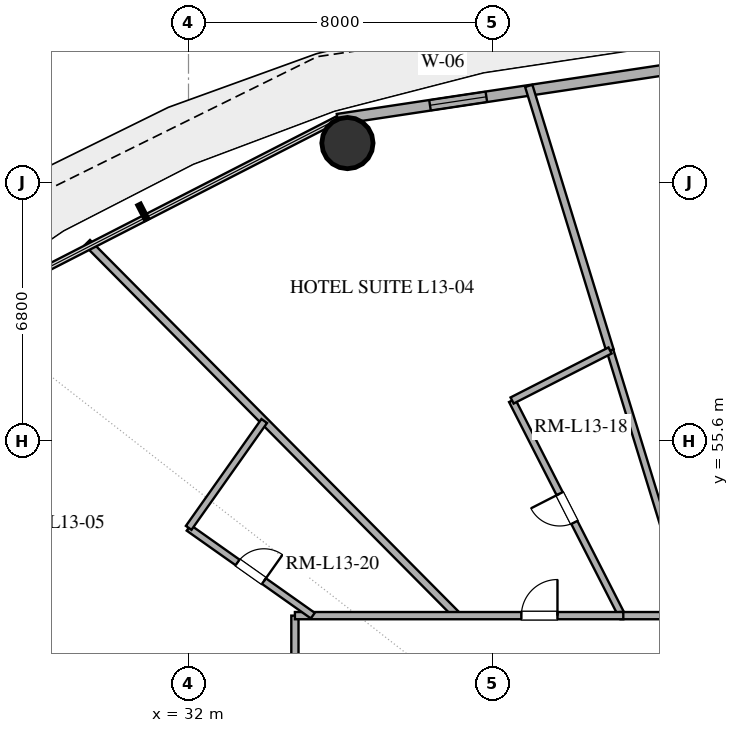
"""IFC4 building model, lengths in metres.
Left out: names, types, materials, properties, quantities, classifications, styles, units other than length and angle.
Written with IfcOpenShell. Run it as: python <this file> out.ifc"""

import sys

from ifc_helpers import new_model, si_unit, direction, frame, frame_2d, origin, origin_2d, place, context, subcontext, project, spatial, rectangle, hollow_circle, extrude, element, fill, save


model = new_model("IFC4")
c1 = context("Model", 3, precision=1e-05, world=origin(), true_north=direction((0.0, 1.0)))
c2 = subcontext(c1, "Body", "Model", "MODEL_VIEW")
j1 = project(units=[si_unit("LENGTHUNIT", "METRE"), si_unit("PLANEANGLEUNIT", "RADIAN")], contexts=[c1])
p1 = place(None, origin())
s1 = spatial("IfcSite", under=j1, at=p1, CompositionType="ELEMENT")
p2 = place(p1, origin())
s2 = spatial("IfcBuilding", under=s1, at=p2, CompositionType="ELEMENT")
p3 = place(p2, frame((0.0, 0.0, 57.0)))
s3 = spatial("IfcBuildingStorey", under=s2, at=p3, CompositionType="ELEMENT", Elevation=57.0)
p4 = place(p3, frame((36.182, 63.434, 0.0), z_axis=(0.0, 0.0, 1.0), x_axis=(1.0, 0.0, 0.0)))
e1 = element("IfcColumn", 1, at=p4, inside=s3, PredefinedType="COLUMN", context=c2, shape_type="SweptSolid", body=[
    extrude(hollow_circle(Radius=0.675, WallThickness=0.036, at=origin_2d()), origin(), (0.0, 0.0, 1.0), 3.38),
])
p5 = place(p3, frame((48.0, 65.88, 0.0), z_axis=(0.0, 0.0, 1.0), x_axis=(-0.988864835849, -0.148816452121, 0.0)))
e2 = element("IfcWall", 2, at=p5, inside=s3, PredefinedType="SOLIDWALL", context=c2, shape_type="SweptSolid", body=[
    extrude(rectangle(XDim=12.214, YDim=0.28, at=frame_2d((6.107, 0.0))), origin(), (0.0, 0.0, 1.0), 3.38),
])
p6 = place(p5, frame((1.531, 0.0, 0.0)))
e3 = element("IfcOpeningElement", 3, at=p6, cuts=e2, PredefinedType="OPENING", context=c2, shape_type="SweptSolid", body=[
    extrude(rectangle(XDim=1.1, YDim=2.25, at=frame_2d((0.55, 1.125))), frame((0.0, 0.15, 0.0), z_axis=(0.0, -1.0, 0.0), x_axis=(1.0, 0.0, 0.0)), (0.0, 0.0, 1.0), 0.3),
])
p7 = place(p5, frame((8.254, 0.0, 0.85)))
e4 = element("IfcOpeningElement", 4, at=p7, cuts=e2, PredefinedType="OPENING", context=c2, shape_type="SweptSolid", body=[
    extrude(rectangle(XDim=1.5, YDim=2.0, at=frame_2d((0.75, 1.0))), frame((0.0, 0.15, 0.0), z_axis=(0.0, -1.0, 0.0), x_axis=(1.0, 0.0, 0.0)), (0.0, 0.0, 1.0), 0.3),
])
p8 = place(p3, frame((34.8, 46.172, 0.0), z_axis=(0.0, 0.0, 1.0), x_axis=(-0.953511676516, 0.301356073023, 0.0)))
e5 = element("IfcWall", 5, at=p8, inside=s3, PredefinedType="PARTITIONING", context=c2, shape_type="SweptSolid", body=[
    extrude(rectangle(XDim=16.275, YDim=0.2, at=frame_2d((8.137, 0.0))), origin(), (0.0, 0.0, 1.0), 2.74),
])
p9 = place(p3, frame((43.092, 57.976, 0.0), z_axis=(0.0, 0.0, 1.0), x_axis=(0.293648581073, -0.95591344317, 0.0)))
e6 = element("IfcWall", 6, at=p9, inside=s3, PredefinedType="PLUMBINGWALL", context=c2, shape_type="SweptSolid", body=[
    extrude(rectangle(XDim=7.298, YDim=0.18, at=frame_2d((3.649, 0.0))), origin(), (0.0, 0.0, 1.0), 2.74),
])
p10 = place(p3, frame((40.953, 64.939, 0.0), z_axis=(0.0, 0.0, 1.0), x_axis=(0.293635973675, -0.955917315966, 0.0)))
e7 = element("IfcWall", 7, at=p10, inside=s3, PredefinedType="PARTITIONING", context=c2, shape_type="SweptSolid", body=[
    extrude(rectangle(XDim=7.284, YDim=0.2, at=frame_2d((3.642, 0.0))), origin(), (0.0, 0.0, 1.0), 2.74),
])
p11 = place(p3, frame((39.072, 51.0, 0.0), z_axis=(0.0, 0.0, 1.0), x_axis=(-0.704257683765, 0.70994444491, 0.0)))
e8 = element("IfcWall", 8, at=p11, inside=s3, PredefinedType="PARTITIONING", context=c2, shape_type="SweptSolid", body=[
    extrude(rectangle(XDim=13.824, YDim=0.2, at=frame_2d((6.912, 0.0))), origin(), (0.0, 0.0, 1.0), 2.74),
])
p12 = place(p3, frame((43.405, 51.0, 0.0), z_axis=(0.0, 0.0, 1.0), x_axis=(-0.454680565764, 0.890654581259, 0.0)))
e9 = element("IfcWall", 9, at=p12, inside=s3, PredefinedType="PLUMBINGWALL", context=c2, shape_type="SweptSolid", body=[
    extrude(rectangle(XDim=6.356, YDim=0.18, at=frame_2d((3.178, 0.0))), origin(), (0.0, 0.0, 1.0), 2.74),
])
p13 = place(p12, frame((2.753, 0.0, 0.0)))
e10 = element("IfcOpeningElement", 10, at=p13, cuts=e9, PredefinedType="OPENING", context=c2, shape_type="SweptSolid", body=[
    extrude(rectangle(XDim=0.85, YDim=2.1, at=frame_2d((0.425, 1.05))), frame((0.0, 0.1, 0.0), z_axis=(0.0, -1.0, 0.0), x_axis=(1.0, 0.0, 0.0)), (0.0, 0.0, 1.0), 0.2),
])
p14 = place(p3, frame((43.369, 51.0, 0.0), z_axis=(0.0, 0.0, 1.0), x_axis=(1.0, 0.0, 0.0)))
e11 = element("IfcWall", 11, at=p14, inside=s3, PredefinedType="PARTITIONING", context=c2, shape_type="SweptSolid", body=[
    extrude(rectangle(XDim=17.831, YDim=0.19, at=frame_2d((8.916, 0.0))), origin(), (0.0, 0.0, 1.0), 2.74),
])
p15 = place(p14, frame((14.29, 0.0, 0.0)))
e12 = element("IfcOpeningElement", 12, at=p15, cuts=e11, PredefinedType="OPENING", context=c2, shape_type="SweptSolid", body=[
    extrude(rectangle(XDim=0.95, YDim=2.15, at=frame_2d((0.475, 1.075))), frame((0.0, 0.105, 0.0), z_axis=(0.0, -1.0, 0.0), x_axis=(1.0, 0.0, 0.0)), (0.0, 0.0, 1.0), 0.21),
])
p16 = place(p14, frame((8.533, 0.0, 0.0)))
e13 = element("IfcOpeningElement", 13, at=p16, cuts=e11, PredefinedType="OPENING", context=c2, shape_type="SweptSolid", body=[
    extrude(rectangle(XDim=1.0, YDim=2.2, at=frame_2d((0.5, 1.1))), frame((0.0, 0.105, 0.0), z_axis=(0.0, -1.0, 0.0), x_axis=(1.0, 0.0, 0.0)), (0.0, 0.0, 1.0), 0.21),
])
p17 = place(p14, frame((3.591, 0.0, 0.0)))
e14 = element("IfcOpeningElement", 14, at=p17, cuts=e11, PredefinedType="OPENING", context=c2, shape_type="SweptSolid", body=[
    extrude(rectangle(XDim=1.0, YDim=2.2, at=frame_2d((0.5, 1.1))), frame((0.0, 0.105, 0.0), z_axis=(0.0, -1.0, 0.0), x_axis=(1.0, 0.0, 0.0)), (0.0, 0.0, 1.0), 0.21),
])
p18 = place(p3, frame((34.8, 43.722, 0.0), z_axis=(0.0, 0.0, 1.0), x_axis=(0.0, 1.0, 0.0)))
e15 = element("IfcWall", 15, at=p18, inside=s3, PredefinedType="PARTITIONING", context=c2, shape_type="SweptSolid", body=[
    extrude(rectangle(XDim=7.278, YDim=0.19, at=frame_2d((3.639, 0.0))), origin(), (0.0, 0.0, 1.0), 2.74),
])
p19 = place(p18, frame((4.372, 0.0, 0.0)))
e16 = element("IfcOpeningElement", 16, at=p19, cuts=e15, PredefinedType="OPENING", context=c2, shape_type="SweptSolid", body=[
    extrude(rectangle(XDim=0.95, YDim=2.15, at=frame_2d((0.475, 1.075))), frame((0.0, 0.105, 0.0), z_axis=(0.0, -1.0, 0.0), x_axis=(1.0, 0.0, 0.0)), (0.0, 0.0, 1.0), 0.21),
])
p20 = place(p3, frame((34.8, 51.0, 0.0), z_axis=(0.0, 0.0, 1.0), x_axis=(1.0, 0.0, 0.0)))
e17 = element("IfcWall", 17, at=p20, inside=s3, PredefinedType="PARTITIONING", context=c2, shape_type="SweptSolid", body=[
    extrude(rectangle(XDim=8.641, YDim=0.19, at=frame_2d((4.32, 0.0))), origin(), (0.0, 0.0, 1.0), 2.74),
])
p21 = place(p20, frame((5.959, 0.0, 0.0)))
e18 = element("IfcOpeningElement", 18, at=p21, cuts=e17, PredefinedType="OPENING", context=c2, shape_type="SweptSolid", body=[
    extrude(rectangle(XDim=0.95, YDim=2.15, at=frame_2d((0.475, 1.075))), frame((0.0, 0.105, 0.0), z_axis=(0.0, -1.0, 0.0), x_axis=(1.0, 0.0, 0.0)), (0.0, 0.0, 1.0), 0.21),
])
p22 = place(p3, frame((32.005, 53.309, 0.0), z_axis=(0.0, 0.0, 1.0), x_axis=(0.816524416543, -0.577310901672, 0.0)))
e19 = element("IfcWall", 19, at=p22, inside=s3, PredefinedType="PLUMBINGWALL", context=c2, shape_type="SweptSolid", body=[
    extrude(rectangle(XDim=4.0, YDim=0.18, at=frame_2d((2.0, 0.0))), origin(), (0.0, 0.0, 1.0), 2.74),
])
p23 = place(p22, frame((1.575, 0.0, 0.0)))
e20 = element("IfcOpeningElement", 20, at=p23, cuts=e19, PredefinedType="OPENING", context=c2, shape_type="SweptSolid", body=[
    extrude(rectangle(XDim=0.85, YDim=2.1, at=frame_2d((0.425, 1.05))), frame((0.0, 0.1, 0.0), z_axis=(0.0, -1.0, 0.0), x_axis=(1.0, 0.0, 0.0)), (0.0, 0.0, 1.0), 0.2),
])
p24 = place(p3, frame((33.993, 56.121, 0.0), z_axis=(0.0, 0.0, 1.0), x_axis=(-0.57730102799, -0.816531397487, 0.0)))
e21 = element("IfcWall", 21, at=p24, inside=s3, PredefinedType="PLUMBINGWALL", context=c2, shape_type="SweptSolid", body=[
    extrude(rectangle(XDim=3.443, YDim=0.18, at=frame_2d((1.722, 0.0))), origin(), (0.0, 0.0, 1.0), 2.74),
])
p25 = place(p3, frame((40.515, 56.661, 0.0), z_axis=(0.0, 0.0, 1.0), x_axis=(0.890666340124, 0.454657531083, 0.0)))
e22 = element("IfcWall", 22, at=p25, inside=s3, PredefinedType="PLUMBINGWALL", context=c2, shape_type="SweptSolid", body=[
    extrude(rectangle(XDim=2.893, YDim=0.18, at=frame_2d((1.447, 0.0))), origin(), (0.0, 0.0, 1.0), 2.74),
])
p26 = place(p7, origin())
e23 = element("IfcWindow", 23, at=p26, inside=s3, PartitioningType="SINGLE_PANEL", PredefinedType="WINDOW", context=c2, shape_type="SweptSolid", body=[
    extrude(rectangle(XDim=1.5, YDim=2.0, at=frame_2d((0.75, 1.0))), frame((0.0, 0.03, 0.0), z_axis=(0.0, -1.0, 0.0), x_axis=(1.0, 0.0, 0.0)), (0.0, 0.0, 1.0), 0.06),
])
fill(e4, e23)
p27 = place(p13, origin())
e24 = element("IfcDoor", 24, at=p27, inside=s3, OperationType="SINGLE_SWING_RIGHT", PredefinedType="DOOR", context=c2, shape_type="SweptSolid", body=[
    extrude(rectangle(XDim=0.85, YDim=2.1, at=frame_2d((0.425, 1.05))), frame((0.0, 0.025, 0.0), z_axis=(0.0, -1.0, 0.0), x_axis=(1.0, 0.0, 0.0)), (0.0, 0.0, 1.0), 0.05),
])
fill(e10, e24)
p28 = place(p21, origin())
e25 = element("IfcDoor", 25, at=p28, inside=s3, OperationType="SINGLE_SWING_RIGHT", PredefinedType="DOOR", context=c2, shape_type="SweptSolid", body=[
    extrude(rectangle(XDim=0.95, YDim=2.15, at=frame_2d((0.475, 1.075))), frame((0.0, 0.025, 0.0), z_axis=(0.0, -1.0, 0.0), x_axis=(1.0, 0.0, 0.0)), (0.0, 0.0, 1.0), 0.05),
])
fill(e18, e25)
p29 = place(p23, origin())
e26 = element("IfcDoor", 26, at=p29, inside=s3, OperationType="SINGLE_SWING_RIGHT", PredefinedType="DOOR", context=c2, shape_type="SweptSolid", body=[
    extrude(rectangle(XDim=0.85, YDim=2.1, at=frame_2d((0.425, 1.05))), frame((0.0, 0.025, 0.0), z_axis=(0.0, -1.0, 0.0), x_axis=(1.0, 0.0, 0.0)), (0.0, 0.0, 1.0), 0.05),
])
fill(e20, e26)
save(model, sys.argv[1])
